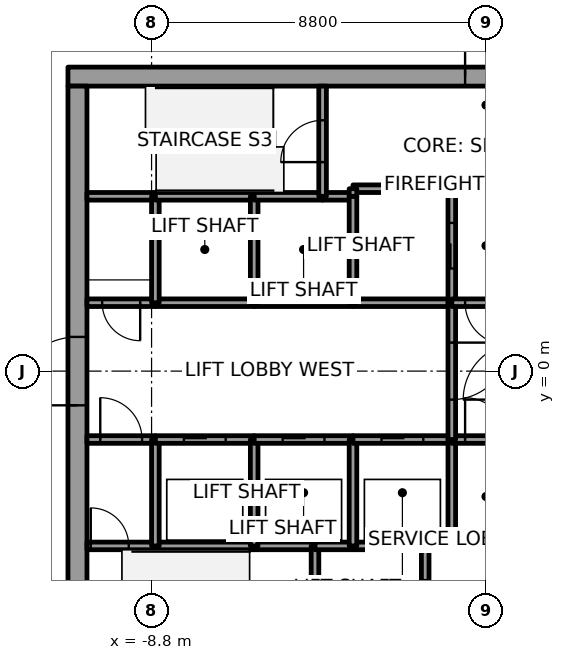
"""IFC4 building model, lengths in metres.
Left out: names, types, materials, properties, quantities, classifications, styles, units other than length and angle.
Written with IfcOpenShell. Run it as: python <this file> out.ifc"""

import sys

from ifc_helpers import new_model, si_unit, direction, frame, frame_2d, origin, place, context, subcontext, project, spatial, rectangle, extrude, element, fill, save


model = new_model("IFC4")
c1 = context("Model", 3, precision=1e-05, world=origin(), true_north=direction((0.0, 1.0)))
c2 = subcontext(c1, "Body", "Model", "MODEL_VIEW")
j1 = project(units=[si_unit("LENGTHUNIT", "METRE"), si_unit("PLANEANGLEUNIT", "RADIAN")], contexts=[c1])
p1 = place(None, origin())
s1 = spatial("IfcSite", under=j1, at=p1, CompositionType="ELEMENT")
p2 = place(p1, origin())
s2 = spatial("IfcBuilding", under=s1, at=p2, CompositionType="ELEMENT")
p3 = place(p2, frame((0.0, 0.0, 201.8)))
s3 = spatial("IfcBuildingStorey", under=s2, at=p3, CompositionType="ELEMENT", Elevation=201.8)
p4 = place(p3, frame((-11.0, 7.75, 0.0), z_axis=(0.0, 0.0, 1.0), x_axis=(1.0, 0.0, 0.0)))
e1 = element("IfcWall", 1, at=p4, inside=s3, PredefinedType="SHEAR", context=c2, shape_type="SweptSolid", body=[
    extrude(rectangle(XDim=22.0, YDim=0.5, at=frame_2d((11.0, 0.0))), origin(), (0.0, 0.0, 1.0), 4.0),
])
p5 = place(p4, frame((10.45, 0.0, 0.0)))
e2 = element("IfcOpeningElement", 2, at=p5, cuts=e1, PredefinedType="OPENING", context=c2, shape_type="SweptSolid", body=[
    extrude(rectangle(XDim=1.1, YDim=2.1, at=frame_2d((0.55, 1.05))), frame((0.0, 0.25, 0.0), z_axis=(0.0, -1.0, 0.0), x_axis=(1.0, 0.0, 0.0)), (0.0, 0.0, 1.0), 0.5),
])
p6 = place(p3, frame((-10.75, -7.5, 0.0), z_axis=(0.0, 0.0, 1.0), x_axis=(0.0, 1.0, 0.0)))
e3 = element("IfcWall", 3, at=p6, inside=s3, PredefinedType="SHEAR", context=c2, shape_type="SweptSolid", body=[
    extrude(rectangle(XDim=15.0, YDim=0.5, at=frame_2d((7.5, 0.0))), origin(), (0.0, 0.0, 1.0), 4.0),
])
p7 = place(p6, frame((6.6, 0.0, 0.0)))
e4 = element("IfcOpeningElement", 4, at=p7, cuts=e3, PredefinedType="OPENING", context=c2, shape_type="SweptSolid", body=[
    extrude(rectangle(XDim=1.8, YDim=2.1, at=frame_2d((0.9, 1.05))), frame((0.0, 0.25, 0.0), z_axis=(0.0, -1.0, 0.0), x_axis=(1.0, 0.0, 0.0)), (0.0, 0.0, 1.0), 0.5),
])
p8 = place(p3, frame((-10.5, -4.6, 0.0), z_axis=(0.0, 0.0, 1.0), x_axis=(1.0, 0.0, 0.0)))
e5 = element("IfcWall", 5, at=p8, inside=s3, PredefinedType="SOLIDWALL", context=c2, shape_type="SweptSolid", body=[
    extrude(rectangle(XDim=1.8, YDim=0.2, at=frame_2d((0.9, 0.0))), origin(), (0.0, 0.0, 1.0), 3.85),
])
p9 = place(p8, frame((0.1, 0.0, 0.0)))
e6 = element("IfcOpeningElement", 6, at=p9, cuts=e5, PredefinedType="OPENING", context=c2, shape_type="SweptSolid", body=[
    extrude(rectangle(XDim=1.0, YDim=2.1, at=frame_2d((0.5, 1.05))), frame((0.0, 0.1, 0.0), z_axis=(0.0, -1.0, 0.0), x_axis=(1.0, 0.0, 0.0)), (0.0, 0.0, 1.0), 0.2),
])
p10 = place(p3, frame((-10.5, -1.8, 0.0), z_axis=(0.0, 0.0, 1.0), x_axis=(1.0, 0.0, 0.0)))
e7 = element("IfcWall", 7, at=p10, inside=s3, PredefinedType="SOLIDWALL", context=c2, shape_type="SweptSolid", body=[
    extrude(rectangle(XDim=1.8, YDim=0.2, at=frame_2d((0.9, 0.0))), origin(), (0.0, 0.0, 1.0), 3.85),
])
p11 = place(p10, frame((0.35, 0.0, 0.0)))
e8 = element("IfcOpeningElement", 8, at=p11, cuts=e7, PredefinedType="OPENING", context=c2, shape_type="SweptSolid", body=[
    extrude(rectangle(XDim=1.1, YDim=2.1, at=frame_2d((0.55, 1.05))), frame((0.0, 0.1, 0.0), z_axis=(0.0, -1.0, 0.0), x_axis=(1.0, 0.0, 0.0)), (0.0, 0.0, 1.0), 0.2),
])
p12 = place(p3, frame((-8.7, 1.8, 0.0), z_axis=(0.0, 0.0, 1.0), x_axis=(-1.0, 0.0, 0.0)))
e9 = element("IfcWall", 9, at=p12, inside=s3, PredefinedType="SOLIDWALL", context=c2, shape_type="SweptSolid", body=[
    extrude(rectangle(XDim=1.8, YDim=0.2, at=frame_2d((0.9, 0.0))), origin(), (0.0, 0.0, 1.0), 3.85),
])
p13 = place(p12, frame((0.4, 0.0, 0.0)))
e10 = element("IfcOpeningElement", 10, at=p13, cuts=e9, PredefinedType="OPENING", context=c2, shape_type="SweptSolid", body=[
    extrude(rectangle(XDim=1.0, YDim=2.1, at=frame_2d((0.5, 1.05))), frame((0.0, 0.1, 0.0), z_axis=(0.0, -1.0, 0.0), x_axis=(1.0, 0.0, 0.0)), (0.0, 0.0, 1.0), 0.2),
])
p14 = place(p3, frame((-8.7, 4.6, 0.0), z_axis=(0.0, 0.0, 1.0), x_axis=(-1.0, 0.0, 0.0)))
e11 = element("IfcWall", 11, at=p14, inside=s3, PredefinedType="SOLIDWALL", context=c2, shape_type="SweptSolid", body=[
    extrude(rectangle(XDim=1.8, YDim=0.2, at=frame_2d((0.9, 0.0))), origin(), (0.0, 0.0, 1.0), 3.85),
])
p15 = place(p3, frame((-8.7, -4.6, 0.0), z_axis=(0.0, 0.0, 1.0), x_axis=(1.0, 0.0, 0.0)))
e12 = element("IfcWall", 12, at=p15, inside=s3, PredefinedType="SOLIDWALL", context=c2, shape_type="SweptSolid", body=[
    extrude(rectangle(XDim=2.6, YDim=0.2, at=frame_2d((1.3, 0.0))), origin(), (0.0, 0.0, 1.0), 3.85),
])
p16 = place(p3, frame((-8.7, -4.6, 0.0), z_axis=(0.0, 0.0, 1.0), x_axis=(0.0, 1.0, 0.0)))
e13 = element("IfcWall", 13, at=p16, inside=s3, PredefinedType="SOLIDWALL", context=c2, shape_type="SweptSolid", body=[
    extrude(rectangle(XDim=2.8, YDim=0.2, at=frame_2d((1.4, 0.0))), origin(), (0.0, 0.0, 1.0), 3.85),
])
p17 = place(p3, frame((-8.7, -1.8, 0.0), z_axis=(0.0, 0.0, 1.0), x_axis=(1.0, 0.0, 0.0)))
e14 = element("IfcWall", 14, at=p17, inside=s3, PredefinedType="SOLIDWALL", context=c2, shape_type="SweptSolid", body=[
    extrude(rectangle(XDim=2.6, YDim=0.2, at=frame_2d((1.3, 0.0))), origin(), (0.0, 0.0, 1.0), 3.85),
])
p18 = place(p17, frame((0.75, 0.0, 0.0)))
e15 = element("IfcOpeningElement", 15, at=p18, cuts=e14, PredefinedType="OPENING", context=c2, shape_type="SweptSolid", body=[
    extrude(rectangle(XDim=1.1, YDim=2.1, at=frame_2d((0.55, 1.05))), frame((0.0, 0.1, 0.0), z_axis=(0.0, -1.0, 0.0), x_axis=(1.0, 0.0, 0.0)), (0.0, 0.0, 1.0), 0.2),
])
p19 = place(p3, frame((-6.1, 1.8, 0.0), z_axis=(0.0, 0.0, 1.0), x_axis=(-1.0, 0.0, 0.0)))
e16 = element("IfcWall", 16, at=p19, inside=s3, PredefinedType="SOLIDWALL", context=c2, shape_type="SweptSolid", body=[
    extrude(rectangle(XDim=2.6, YDim=0.2, at=frame_2d((1.3, 0.0))), origin(), (0.0, 0.0, 1.0), 3.85),
])
p20 = place(p3, frame((-8.7, 1.8, 0.0), z_axis=(0.0, 0.0, 1.0), x_axis=(0.0, 1.0, 0.0)))
e17 = element("IfcWall", 17, at=p20, inside=s3, PredefinedType="SOLIDWALL", context=c2, shape_type="SweptSolid", body=[
    extrude(rectangle(XDim=2.8, YDim=0.2, at=frame_2d((1.4, 0.0))), origin(), (0.0, 0.0, 1.0), 3.85),
])
p21 = place(p3, frame((-6.1, 4.6, 0.0), z_axis=(0.0, 0.0, 1.0), x_axis=(-1.0, 0.0, 0.0)))
e18 = element("IfcWall", 18, at=p21, inside=s3, PredefinedType="SOLIDWALL", context=c2, shape_type="SweptSolid", body=[
    extrude(rectangle(XDim=2.6, YDim=0.2, at=frame_2d((1.3, 0.0))), origin(), (0.0, 0.0, 1.0), 3.85),
])
p22 = place(p3, frame((-6.1, -4.6, 0.0), z_axis=(0.0, 0.0, 1.0), x_axis=(1.0, 0.0, 0.0)))
e19 = element("IfcWall", 19, at=p22, inside=s3, PredefinedType="SOLIDWALL", context=c2, shape_type="SweptSolid", body=[
    extrude(rectangle(XDim=1.6, YDim=0.2, at=frame_2d((0.8, 0.0))), origin(), (0.0, 0.0, 1.0), 3.85),
])
p23 = place(p3, frame((-6.1, -4.6, 0.0), z_axis=(0.0, 0.0, 1.0), x_axis=(0.0, 1.0, 0.0)))
e20 = element("IfcWall", 20, at=p23, inside=s3, PredefinedType="SOLIDWALL", context=c2, shape_type="SweptSolid", body=[
    extrude(rectangle(XDim=2.8, YDim=0.2, at=frame_2d((1.4, 0.0))), origin(), (0.0, 0.0, 1.0), 3.85),
])
p24 = place(p3, frame((-6.1, -1.8, 0.0), z_axis=(0.0, 0.0, 1.0), x_axis=(1.0, 0.0, 0.0)))
e21 = element("IfcWall", 21, at=p24, inside=s3, PredefinedType="SOLIDWALL", context=c2, shape_type="SweptSolid", body=[
    extrude(rectangle(XDim=2.6, YDim=0.2, at=frame_2d((1.3, 0.0))), origin(), (0.0, 0.0, 1.0), 3.85),
])
p25 = place(p24, frame((0.75, 0.0, 0.0)))
e22 = element("IfcOpeningElement", 22, at=p25, cuts=e21, PredefinedType="OPENING", context=c2, shape_type="SweptSolid", body=[
    extrude(rectangle(XDim=1.1, YDim=2.1, at=frame_2d((0.55, 1.05))), frame((0.0, 0.1, 0.0), z_axis=(0.0, -1.0, 0.0), x_axis=(1.0, 0.0, 0.0)), (0.0, 0.0, 1.0), 0.2),
])
p26 = place(p3, frame((-3.5, 1.8, 0.0), z_axis=(0.0, 0.0, 1.0), x_axis=(-1.0, 0.0, 0.0)))
e23 = element("IfcWall", 23, at=p26, inside=s3, PredefinedType="SOLIDWALL", context=c2, shape_type="SweptSolid", body=[
    extrude(rectangle(XDim=2.6, YDim=0.2, at=frame_2d((1.3, 0.0))), origin(), (0.0, 0.0, 1.0), 3.85),
])
p27 = place(p3, frame((-6.1, 1.8, 0.0), z_axis=(0.0, 0.0, 1.0), x_axis=(0.0, 1.0, 0.0)))
e24 = element("IfcWall", 24, at=p27, inside=s3, PredefinedType="SOLIDWALL", context=c2, shape_type="SweptSolid", body=[
    extrude(rectangle(XDim=2.8, YDim=0.2, at=frame_2d((1.4, 0.0))), origin(), (0.0, 0.0, 1.0), 3.85),
])
p28 = place(p3, frame((-4.3, 4.6, 0.0), z_axis=(0.0, 0.0, 1.0), x_axis=(-1.0, 0.0, 0.0)))
e25 = element("IfcWall", 25, at=p28, inside=s3, PredefinedType="SOLIDWALL", context=c2, shape_type="SweptSolid", body=[
    extrude(rectangle(XDim=1.8, YDim=0.2, at=frame_2d((0.9, 0.0))), origin(), (0.0, 0.0, 1.0), 3.85),
])
p29 = place(p3, frame((-4.5, -4.6, 0.0), z_axis=(0.0, 0.0, 1.0), x_axis=(0.0, -1.0, 0.0)))
e26 = element("IfcWall", 26, at=p29, inside=s3, PredefinedType="SOLIDWALL", context=c2, shape_type="SweptSolid", body=[
    extrude(rectangle(XDim=2.9, YDim=0.2, at=frame_2d((1.45, 0.0))), origin(), (0.0, 0.0, 1.0), 3.85),
])
p30 = place(p3, frame((-4.5, -4.6, 0.0), z_axis=(0.0, 0.0, 1.0), x_axis=(1.0, 0.0, 0.0)))
e27 = element("IfcWall", 27, at=p30, inside=s3, PredefinedType="SOLIDWALL", context=c2, shape_type="SweptSolid", body=[
    extrude(rectangle(XDim=1.0, YDim=0.2, at=frame_2d((0.5, 0.0))), origin(), (0.0, 0.0, 1.0), 3.85),
])
p31 = place(p3, frame((-3.5, 4.6, 0.0), z_axis=(0.0, 0.0, 1.0), x_axis=(-1.0, 0.0, 0.0)))
e28 = element("IfcWall", 28, at=p31, inside=s3, PredefinedType="SOLIDWALL", context=c2, shape_type="SweptSolid", body=[
    extrude(rectangle(XDim=0.8, YDim=0.2, at=frame_2d((0.4, 0.0))), origin(), (0.0, 0.0, 1.0), 3.85),
])
p32 = place(p3, frame((-4.3, 4.6, 0.0), z_axis=(0.0, 0.0, 1.0), x_axis=(0.0, 1.0, 0.0)))
e29 = element("IfcWall", 29, at=p32, inside=s3, PredefinedType="SOLIDWALL", context=c2, shape_type="SweptSolid", body=[
    extrude(rectangle(XDim=2.9, YDim=0.2, at=frame_2d((1.45, 0.0))), origin(), (0.0, 0.0, 1.0), 3.85),
])
p33 = place(p32, frame((0.9, 0.0, 0.0)))
e30 = element("IfcOpeningElement", 30, at=p33, cuts=e29, PredefinedType="OPENING", context=c2, shape_type="SweptSolid", body=[
    extrude(rectangle(XDim=1.1, YDim=2.1, at=frame_2d((0.55, 1.05))), frame((0.0, 0.1, 0.0), z_axis=(0.0, -1.0, 0.0), x_axis=(1.0, 0.0, 0.0)), (0.0, 0.0, 1.0), 0.2),
])
p34 = place(p3, frame((-3.5, -4.6, 0.0), z_axis=(0.0, 0.0, 1.0), x_axis=(1.0, 0.0, 0.0)))
e31 = element("IfcWall", 31, at=p34, inside=s3, PredefinedType="SOLIDWALL", context=c2, shape_type="SweptSolid", body=[
    extrude(rectangle(XDim=1.9, YDim=0.2, at=frame_2d((0.95, 0.0))), origin(), (0.0, 0.0, 1.0), 3.85),
])
p35 = place(p3, frame((-3.5, -4.6, 0.0), z_axis=(0.0, 0.0, 1.0), x_axis=(0.0, 1.0, 0.0)))
e32 = element("IfcWall", 32, at=p35, inside=s3, PredefinedType="SOLIDWALL", context=c2, shape_type="SweptSolid", body=[
    extrude(rectangle(XDim=2.8, YDim=0.2, at=frame_2d((1.4, 0.0))), origin(), (0.0, 0.0, 1.0), 3.85),
])
p36 = place(p3, frame((-3.5, -1.8, 0.0), z_axis=(0.0, 0.0, 1.0), x_axis=(1.0, 0.0, 0.0)))
e33 = element("IfcWall", 33, at=p36, inside=s3, PredefinedType="SOLIDWALL", context=c2, shape_type="SweptSolid", body=[
    extrude(rectangle(XDim=2.6, YDim=0.2, at=frame_2d((1.3, 0.0))), origin(), (0.0, 0.0, 1.0), 3.85),
])
p37 = place(p36, frame((0.75, 0.0, 0.0)))
e34 = element("IfcOpeningElement", 34, at=p37, cuts=e33, PredefinedType="OPENING", context=c2, shape_type="SweptSolid", body=[
    extrude(rectangle(XDim=1.1, YDim=2.1, at=frame_2d((0.55, 1.05))), frame((0.0, 0.1, 0.0), z_axis=(0.0, -1.0, 0.0), x_axis=(1.0, 0.0, 0.0)), (0.0, 0.0, 1.0), 0.2),
])
p38 = place(p3, frame((-0.9, 1.8, 0.0), z_axis=(0.0, 0.0, 1.0), x_axis=(-1.0, 0.0, 0.0)))
e35 = element("IfcWall", 35, at=p38, inside=s3, PredefinedType="SOLIDWALL", context=c2, shape_type="SweptSolid", body=[
    extrude(rectangle(XDim=2.6, YDim=0.2, at=frame_2d((1.3, 0.0))), origin(), (0.0, 0.0, 1.0), 3.85),
])
p39 = place(p3, frame((-3.5, 4.6, 0.0), z_axis=(0.0, 0.0, 1.0), x_axis=(0.0, -1.0, 0.0)))
e36 = element("IfcWall", 36, at=p39, inside=s3, PredefinedType="SOLIDWALL", context=c2, shape_type="SweptSolid", body=[
    extrude(rectangle(XDim=2.8, YDim=0.2, at=frame_2d((1.4, 0.0))), origin(), (0.0, 0.0, 1.0), 3.85),
])
p40 = place(p3, frame((-0.9, 1.8, 0.0), z_axis=(0.0, 0.0, 1.0), x_axis=(0.0, 1.0, 0.0)))
e37 = element("IfcWall", 37, at=p40, inside=s3, PredefinedType="SOLIDWALL", context=c2, shape_type="SweptSolid", body=[
    extrude(rectangle(XDim=3.0, YDim=0.2, at=frame_2d((1.5, 0.0))), origin(), (0.0, 0.0, 1.0), 3.85),
])
p41 = place(p40, frame((0.9, 0.0, 0.0)))
e38 = element("IfcOpeningElement", 38, at=p41, cuts=e37, PredefinedType="OPENING", context=c2, shape_type="SweptSolid", body=[
    extrude(rectangle(XDim=1.2, YDim=2.1, at=frame_2d((0.6, 1.05))), frame((0.0, 0.1, 0.0), z_axis=(0.0, -1.0, 0.0), x_axis=(1.0, 0.0, 0.0)), (0.0, 0.0, 1.0), 0.2),
])
p42 = place(p3, frame((-0.9, 4.8, 0.0), z_axis=(0.0, 0.0, 1.0), x_axis=(-1.0, 0.0, 0.0)))
e39 = element("IfcWall", 39, at=p42, inside=s3, PredefinedType="SOLIDWALL", context=c2, shape_type="SweptSolid", body=[
    extrude(rectangle(XDim=2.6, YDim=0.2, at=frame_2d((1.3, 0.0))), origin(), (0.0, 0.0, 1.0), 3.85),
])
p43 = place(p3, frame((-3.5, 4.8, 0.0), z_axis=(0.0, 0.0, 1.0), x_axis=(0.0, -1.0, 0.0)))
e40 = element("IfcWall", 40, at=p43, inside=s3, PredefinedType="SOLIDWALL", context=c2, shape_type="SweptSolid", body=[
    extrude(rectangle(XDim=0.2, YDim=0.2, at=frame_2d((0.1, 0.0))), origin(), (0.0, 0.0, 1.0), 3.85),
])
p44 = place(p3, frame((-1.6, -7.5, 0.0), z_axis=(0.0, 0.0, 1.0), x_axis=(0.0, 1.0, 0.0)))
e41 = element("IfcWall", 41, at=p44, inside=s3, PredefinedType="SOLIDWALL", context=c2, shape_type="SweptSolid", body=[
    extrude(rectangle(XDim=2.9, YDim=0.2, at=frame_2d((1.45, 0.0))), origin(), (0.0, 0.0, 1.0), 3.85),
])
p45 = place(p44, frame((0.9, 0.0, 0.0)))
e42 = element("IfcOpeningElement", 42, at=p45, cuts=e41, PredefinedType="OPENING", context=c2, shape_type="SweptSolid", body=[
    extrude(rectangle(XDim=1.1, YDim=2.1, at=frame_2d((0.55, 1.05))), frame((0.0, 0.1, 0.0), z_axis=(0.0, -1.0, 0.0), x_axis=(1.0, 0.0, 0.0)), (0.0, 0.0, 1.0), 0.2),
])
p46 = place(p3, frame((-1.6, -4.6, 0.0), z_axis=(0.0, 0.0, 1.0), x_axis=(1.0, 0.0, 0.0)))
e43 = element("IfcWall", 43, at=p46, inside=s3, PredefinedType="SOLIDWALL", context=c2, shape_type="SweptSolid", body=[
    extrude(rectangle(XDim=0.7, YDim=0.2, at=frame_2d((0.35, 0.0))), origin(), (0.0, 0.0, 1.0), 3.85),
])
p47 = place(p3, frame((-0.9, -4.6, 0.0), z_axis=(0.0, 0.0, 1.0), x_axis=(0.0, 1.0, 0.0)))
e44 = element("IfcWall", 44, at=p47, inside=s3, PredefinedType="SOLIDWALL", context=c2, shape_type="SweptSolid", body=[
    extrude(rectangle(XDim=2.8, YDim=0.2, at=frame_2d((1.4, 0.0))), origin(), (0.0, 0.0, 1.0), 3.85),
])
p48 = place(p3, frame((-0.9, -1.8, 0.0), z_axis=(0.0, 0.0, 1.0), x_axis=(1.0, 0.0, 0.0)))
e45 = element("IfcWall", 45, at=p48, inside=s3, PredefinedType="SOLIDWALL", context=c2, shape_type="SweptSolid", body=[
    extrude(rectangle(XDim=1.8, YDim=0.2, at=frame_2d((0.9, 0.0))), origin(), (0.0, 0.0, 1.0), 3.85),
])
p49 = place(p48, frame((0.35, 0.0, 0.0)))
e46 = element("IfcOpeningElement", 46, at=p49, cuts=e45, PredefinedType="OPENING", context=c2, shape_type="SweptSolid", body=[
    extrude(rectangle(XDim=1.1, YDim=2.1, at=frame_2d((0.55, 1.05))), frame((0.0, 0.1, 0.0), z_axis=(0.0, -1.0, 0.0), x_axis=(1.0, 0.0, 0.0)), (0.0, 0.0, 1.0), 0.2),
])
p50 = place(p3, frame((-0.9, 1.8, 0.0), z_axis=(0.0, 0.0, 1.0), x_axis=(0.0, -1.0, 0.0)))
e47 = element("IfcWall", 47, at=p50, inside=s3, PredefinedType="SOLIDWALL", context=c2, shape_type="SweptSolid", body=[
    extrude(rectangle(XDim=3.6, YDim=0.2, at=frame_2d((1.8, 0.0))), origin(), (0.0, 0.0, 1.0), 3.85),
])
p51 = place(p50, frame((1.05, 0.0, 0.0)))
e48 = element("IfcOpeningElement", 48, at=p51, cuts=e47, PredefinedType="OPENING", context=c2, shape_type="SweptSolid", body=[
    extrude(rectangle(XDim=1.5, YDim=2.1, at=frame_2d((0.75, 1.05))), frame((0.0, 0.1, 0.0), z_axis=(0.0, -1.0, 0.0), x_axis=(1.0, 0.0, 0.0)), (0.0, 0.0, 1.0), 0.2),
])
p52 = place(p3, frame((0.9, 1.8, 0.0), z_axis=(0.0, 0.0, 1.0), x_axis=(-1.0, 0.0, 0.0)))
e49 = element("IfcWall", 49, at=p52, inside=s3, PredefinedType="SOLIDWALL", context=c2, shape_type="SweptSolid", body=[
    extrude(rectangle(XDim=1.8, YDim=0.2, at=frame_2d((0.9, 0.0))), origin(), (0.0, 0.0, 1.0), 3.85),
])
p53 = place(p52, frame((0.35, 0.0, 0.0)))
e50 = element("IfcOpeningElement", 50, at=p53, cuts=e49, PredefinedType="OPENING", context=c2, shape_type="SweptSolid", body=[
    extrude(rectangle(XDim=1.1, YDim=2.1, at=frame_2d((0.55, 1.05))), frame((0.0, 0.1, 0.0), z_axis=(0.0, -1.0, 0.0), x_axis=(1.0, 0.0, 0.0)), (0.0, 0.0, 1.0), 0.2),
])
p54 = place(p18, origin())
e51 = element("IfcDoor", 51, at=p54, inside=s3, OperationType="SLIDING_TO_LEFT", PredefinedType="DOOR", context=c2, shape_type="SweptSolid", body=[
    extrude(rectangle(XDim=1.1, YDim=2.1, at=frame_2d((0.55, 1.05))), frame((0.0, 0.025, 0.0), z_axis=(0.0, -1.0, 0.0), x_axis=(1.0, 0.0, 0.0)), (0.0, 0.0, 1.0), 0.05),
])
fill(e15, e51)
p55 = place(p25, origin())
e52 = element("IfcDoor", 52, at=p55, inside=s3, OperationType="SLIDING_TO_LEFT", PredefinedType="DOOR", context=c2, shape_type="SweptSolid", body=[
    extrude(rectangle(XDim=1.1, YDim=2.1, at=frame_2d((0.55, 1.05))), frame((0.0, 0.025, 0.0), z_axis=(0.0, -1.0, 0.0), x_axis=(1.0, 0.0, 0.0)), (0.0, 0.0, 1.0), 0.05),
])
fill(e22, e52)
p56 = place(p37, origin())
e53 = element("IfcDoor", 53, at=p56, inside=s3, OperationType="SLIDING_TO_LEFT", PredefinedType="DOOR", context=c2, shape_type="SweptSolid", body=[
    extrude(rectangle(XDim=1.1, YDim=2.1, at=frame_2d((0.55, 1.05))), frame((0.0, 0.025, 0.0), z_axis=(0.0, -1.0, 0.0), x_axis=(1.0, 0.0, 0.0)), (0.0, 0.0, 1.0), 0.05),
])
fill(e34, e53)
p57 = place(p41, origin())
e54 = element("IfcDoor", 54, at=p57, inside=s3, OperationType="SLIDING_TO_LEFT", PredefinedType="DOOR", context=c2, shape_type="SweptSolid", body=[
    extrude(rectangle(XDim=1.2, YDim=2.1, at=frame_2d((0.6, 1.05))), frame((0.0, 0.025, 0.0), z_axis=(0.0, -1.0, 0.0), x_axis=(1.0, 0.0, 0.0)), (0.0, 0.0, 1.0), 0.05),
])
fill(e38, e54)
p58 = place(p51, origin())
e55 = element("IfcDoor", 55, at=p58, inside=s3, OperationType="DOUBLE_DOOR_SINGLE_SWING", PredefinedType="DOOR", context=c2, shape_type="SweptSolid", body=[
    extrude(rectangle(XDim=1.5, YDim=2.1, at=frame_2d((0.75, 1.05))), frame((0.0, 0.025, 0.0), z_axis=(0.0, -1.0, 0.0), x_axis=(1.0, 0.0, 0.0)), (0.0, 0.0, 1.0), 0.05),
])
fill(e48, e55)
p59 = place(p11, origin())
e56 = element("IfcDoor", 56, at=p59, inside=s3, OperationType="SINGLE_SWING_LEFT", PredefinedType="DOOR", context=c2, shape_type="SweptSolid", body=[
    extrude(rectangle(XDim=1.1, YDim=2.1, at=frame_2d((0.55, 1.05))), frame((0.0, 0.025, 0.0), z_axis=(0.0, -1.0, 0.0), x_axis=(1.0, 0.0, 0.0)), (0.0, 0.0, 1.0), 0.05),
])
fill(e8, e56)
p60 = place(p53, origin())
e57 = element("IfcDoor", 57, at=p60, inside=s3, OperationType="SINGLE_SWING_RIGHT", PredefinedType="DOOR", context=c2, shape_type="SweptSolid", body=[
    extrude(rectangle(XDim=1.1, YDim=2.1, at=frame_2d((0.55, 1.05))), frame((0.0, 0.025, 0.0), z_axis=(0.0, -1.0, 0.0), x_axis=(1.0, 0.0, 0.0)), (0.0, 0.0, 1.0), 0.05),
])
fill(e50, e57)
p61 = place(p49, origin())
e58 = element("IfcDoor", 58, at=p61, inside=s3, OperationType="SINGLE_SWING_LEFT", PredefinedType="DOOR", context=c2, shape_type="SweptSolid", body=[
    extrude(rectangle(XDim=1.1, YDim=2.1, at=frame_2d((0.55, 1.05))), frame((0.0, 0.025, 0.0), z_axis=(0.0, -1.0, 0.0), x_axis=(1.0, 0.0, 0.0)), (0.0, 0.0, 1.0), 0.05),
])
fill(e46, e58)
p62 = place(p13, origin())
e59 = element("IfcDoor", 59, at=p62, inside=s3, OperationType="SINGLE_SWING_RIGHT", PredefinedType="DOOR", context=c2, shape_type="SweptSolid", body=[
    extrude(rectangle(XDim=1.0, YDim=2.1, at=frame_2d((0.5, 1.05))), frame((0.0, 0.025, 0.0), z_axis=(0.0, -1.0, 0.0), x_axis=(1.0, 0.0, 0.0)), (0.0, 0.0, 1.0), 0.05),
])
fill(e10, e59)
p63 = place(p9, origin())
e60 = element("IfcDoor", 60, at=p63, inside=s3, OperationType="SINGLE_SWING_LEFT", PredefinedType="DOOR", context=c2, shape_type="SweptSolid", body=[
    extrude(rectangle(XDim=1.0, YDim=2.1, at=frame_2d((0.5, 1.05))), frame((0.0, 0.025, 0.0), z_axis=(0.0, -1.0, 0.0), x_axis=(1.0, 0.0, 0.0)), (0.0, 0.0, 1.0), 0.05),
])
fill(e6, e60)
p64 = place(p33, origin())
e61 = element("IfcDoor", 61, at=p64, inside=s3, OperationType="SINGLE_SWING_RIGHT", PredefinedType="DOOR", context=c2, shape_type="SweptSolid", body=[
    extrude(rectangle(XDim=1.1, YDim=2.1, at=frame_2d((0.55, 1.05))), frame((0.0, 0.025, 0.0), z_axis=(0.0, -1.0, 0.0), x_axis=(1.0, 0.0, 0.0)), (0.0, 0.0, 1.0), 0.05),
])
fill(e30, e61)
p65 = place(p7, origin())
e62 = element("IfcDoor", 62, at=p65, inside=s3, OperationType="DOUBLE_DOOR_SINGLE_SWING", PredefinedType="DOOR", context=c2, shape_type="SweptSolid", body=[
    extrude(rectangle(XDim=1.8, YDim=2.1, at=frame_2d((0.9, 1.05))), frame((0.0, 0.025, 0.0), z_axis=(0.0, -1.0, 0.0), x_axis=(1.0, 0.0, 0.0)), (0.0, 0.0, 1.0), 0.05),
])
fill(e4, e62)
p66 = place(p5, origin())
e63 = element("IfcDoor", 63, at=p66, inside=s3, OperationType="SINGLE_SWING_LEFT", PredefinedType="DOOR", context=c2, shape_type="SweptSolid", body=[
    extrude(rectangle(XDim=1.1, YDim=2.1, at=frame_2d((0.55, 1.05))), frame((0.0, 0.025, 0.0), z_axis=(0.0, -1.0, 0.0), x_axis=(1.0, 0.0, 0.0)), (0.0, 0.0, 1.0), 0.05),
])
fill(e2, e63)
save(model, sys.argv[1])
